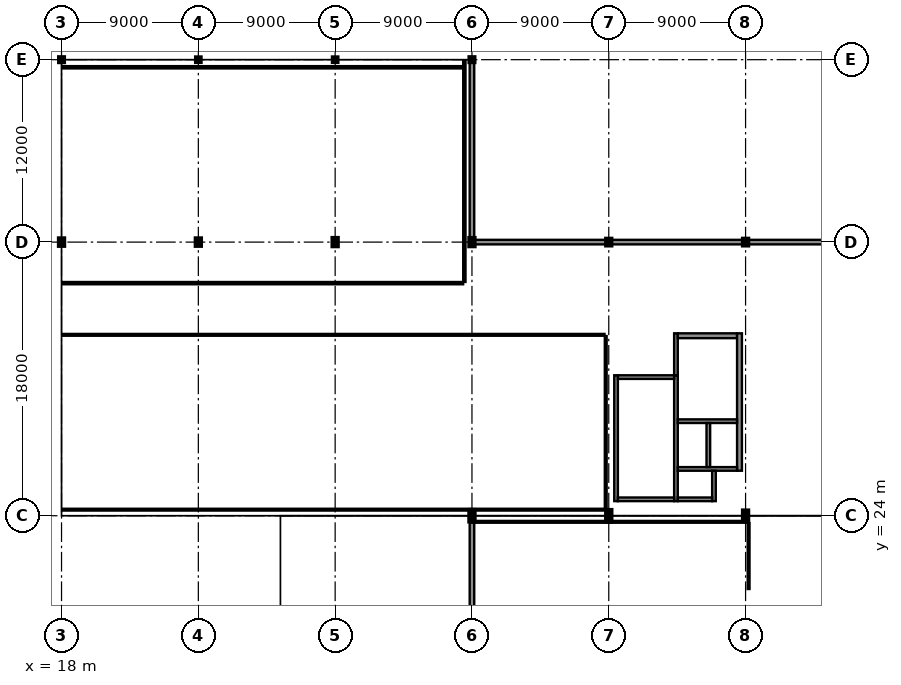
"""IFC4 building model, lengths in metres.
Left out: names, types, materials, properties, quantities, classifications, styles, units other than length and angle.
Written with IfcOpenShell. Run it as: python <this file> out.ifc"""

import sys

from ifc_helpers import new_model, si_unit, direction, frame, frame_2d, origin, origin_2d, place, context, subcontext, project, spatial, rectangle, i_section, extrude, element, fill, save


model = new_model("IFC4")
c1 = context("Model", 3, precision=1e-05, world=origin(), true_north=direction((0.0, 1.0)))
c2 = subcontext(c1, "Body", "Model", "MODEL_VIEW")
j1 = project(units=[si_unit("LENGTHUNIT", "METRE"), si_unit("PLANEANGLEUNIT", "RADIAN")], contexts=[c1])
p1 = place(None, origin())
s1 = spatial("IfcSite", under=j1, at=p1, CompositionType="ELEMENT")
p2 = place(p1, origin())
s2 = spatial("IfcBuilding", under=s1, at=p2, CompositionType="ELEMENT")
p3 = place(p2, frame((0.0, 0.0, 14.4)))
s3 = spatial("IfcBuildingStorey", under=s2, at=p3, CompositionType="ELEMENT", Elevation=14.4)
p4 = place(p3, frame((18.0, 42.0, 0.0), z_axis=(0.0, 0.0, 1.0), x_axis=(1.0, 0.0, 0.0)))
e1 = element("IfcColumn", 1, at=p4, inside=s3, PredefinedType="COLUMN", context=c2, shape_type="SweptSolid", body=[
    extrude(i_section(OverallWidth=0.3, OverallDepth=0.45, WebThickness=0.014, FlangeThickness=0.026, at=origin_2d()), origin(), (0.0, 0.0, 1.0), 4.3),
])
p5 = place(p3, frame((18.0, 54.0, 0.0), z_axis=(0.0, 0.0, 1.0), x_axis=(1.0, 0.0, 0.0)))
e2 = element("IfcColumn", 2, at=p5, inside=s3, PredefinedType="COLUMN", context=c2, shape_type="SweptSolid", body=[
    extrude(i_section(OverallWidth=0.28, OverallDepth=0.28, WebThickness=0.01, FlangeThickness=0.018, at=origin_2d()), origin(), (0.0, 0.0, 1.0), 4.3),
])
p6 = place(p3, frame((27.0, 42.0, 0.0), z_axis=(0.0, 0.0, 1.0), x_axis=(0.0, 1.0, 0.0)))
e3 = element("IfcColumn", 3, at=p6, inside=s3, PredefinedType="COLUMN", context=c2, shape_type="SweptSolid", body=[
    extrude(i_section(OverallWidth=0.3, OverallDepth=0.45, WebThickness=0.014, FlangeThickness=0.026, at=origin_2d()), origin(), (0.0, 0.0, 1.0), 4.3),
])
p7 = place(p3, frame((27.0, 54.0, 0.0), z_axis=(0.0, 0.0, 1.0), x_axis=(1.0, 0.0, 0.0)))
e4 = element("IfcColumn", 4, at=p7, inside=s3, PredefinedType="COLUMN", context=c2, shape_type="SweptSolid", body=[
    extrude(i_section(OverallWidth=0.26, OverallDepth=0.26, WebThickness=0.01, FlangeThickness=0.018, at=origin_2d()), origin(), (0.0, 0.0, 1.0), 4.3),
])
p8 = place(p3, frame((36.0, 42.0, 0.0), z_axis=(0.0, 0.0, 1.0), x_axis=(1.0, 0.0, 0.0)))
e5 = element("IfcColumn", 5, at=p8, inside=s3, PredefinedType="COLUMN", context=c2, shape_type="SweptSolid", body=[
    extrude(i_section(OverallWidth=0.3, OverallDepth=0.5, WebThickness=0.014, FlangeThickness=0.028, at=origin_2d()), origin(), (0.0, 0.0, 1.0), 4.3),
])
p9 = place(p3, frame((36.0, 54.0, 0.0), z_axis=(0.0, 0.0, 1.0), x_axis=(1.0, 0.0, 0.0)))
e6 = element("IfcColumn", 6, at=p9, inside=s3, PredefinedType="COLUMN", context=c2, shape_type="SweptSolid", body=[
    extrude(i_section(OverallWidth=0.26, OverallDepth=0.26, WebThickness=0.01, FlangeThickness=0.018, at=origin_2d()), origin(), (0.0, 0.0, 1.0), 4.3),
])
p10 = place(p3, frame((45.0, 24.0, 0.0), z_axis=(0.0, 0.0, 1.0), x_axis=(1.0, 0.0, 0.0)))
e7 = element("IfcColumn", 7, at=p10, inside=s3, PredefinedType="COLUMN", context=c2, shape_type="SweptSolid", body=[
    extrude(i_section(OverallWidth=0.304, OverallDepth=0.716, WebThickness=0.021, FlangeThickness=0.04, at=origin_2d()), origin(), (0.0, 0.0, 1.0), 4.5),
])
p11 = place(p3, frame((45.0, 42.0, 0.0), z_axis=(0.0, 0.0, 1.0), x_axis=(1.0, 0.0, 0.0)))
e8 = element("IfcColumn", 8, at=p11, inside=s3, PredefinedType="COLUMN", context=c2, shape_type="SweptSolid", body=[
    extrude(i_section(OverallWidth=0.3, OverallDepth=0.5, WebThickness=0.014, FlangeThickness=0.028, at=origin_2d()), origin(), (0.0, 0.0, 1.0), 4.3),
])
p12 = place(p3, frame((45.0, 54.0, 0.0), z_axis=(0.0, 0.0, 1.0), x_axis=(1.0, 0.0, 0.0)))
e9 = element("IfcColumn", 9, at=p12, inside=s3, PredefinedType="COLUMN", context=c2, shape_type="SweptSolid", body=[
    extrude(i_section(OverallWidth=0.28, OverallDepth=0.28, WebThickness=0.01, FlangeThickness=0.018, at=origin_2d()), origin(), (0.0, 0.0, 1.0), 4.3),
])
p13 = place(p3, frame((54.0, 24.0, 0.0), z_axis=(0.0, 0.0, 1.0), x_axis=(0.0, 1.0, 0.0)))
e10 = element("IfcColumn", 10, at=p13, inside=s3, PredefinedType="COLUMN", context=c2, shape_type="SweptSolid", body=[
    extrude(i_section(OverallWidth=0.304, OverallDepth=0.716, WebThickness=0.021, FlangeThickness=0.04, at=origin_2d()), origin(), (0.0, 0.0, 1.0), 4.5),
])
p14 = place(p3, frame((54.0, 42.0, 0.0), z_axis=(0.0, 0.0, 1.0), x_axis=(1.0, 0.0, 0.0)))
e11 = element("IfcColumn", 11, at=p14, inside=s3, PredefinedType="COLUMN", context=c2, shape_type="SweptSolid", body=[
    extrude(i_section(OverallWidth=0.3, OverallDepth=0.4, WebThickness=0.013, FlangeThickness=0.024, at=origin_2d()), origin(), (0.0, 0.0, 1.0), 4.5),
])
p15 = place(p3, frame((63.0, 24.0, 0.0), z_axis=(0.0, 0.0, 1.0), x_axis=(1.0, 0.0, 0.0)))
e12 = element("IfcColumn", 12, at=p15, inside=s3, PredefinedType="COLUMN", context=c2, shape_type="SweptSolid", body=[
    extrude(i_section(OverallWidth=0.3, OverallDepth=0.65, WebThickness=0.016, FlangeThickness=0.031, at=origin_2d()), origin(), (0.0, 0.0, 1.0), 4.5),
])
p16 = place(p3, frame((63.0, 42.0, 0.0), z_axis=(0.0, 0.0, 1.0), x_axis=(1.0, 0.0, 0.0)))
e13 = element("IfcColumn", 13, at=p16, inside=s3, PredefinedType="COLUMN", context=c2, shape_type="SweptSolid", body=[
    extrude(i_section(OverallWidth=0.3, OverallDepth=0.4, WebThickness=0.013, FlangeThickness=0.024, at=origin_2d()), origin(), (0.0, 0.0, 1.0), 4.5),
])
p17 = place(p3, frame((71.777, 42.0, 0.0), z_axis=(0.0, 0.0, 1.0), x_axis=(-1.0, 0.0, 0.0)))
e14 = element("IfcWall", 14, at=p17, inside=s3, PredefinedType="SOLIDWALL", context=c2, shape_type="SweptSolid", body=[
    extrude(rectangle(XDim=8.769, YDim=0.3, at=frame_2d((4.385, 0.0))), origin(), (0.0, 0.0, 1.0), 3.595),
])
for number, where, z_axis, x_axis in (
    (15, (62.992, 42.0, 0.0), (0.0, 0.0, 1.0), (-1.0, 0.0, 0.0)),
    (16, (53.992, 42.0, 0.0), (0.0, 0.0, 1.0), (-1.0, 0.0, 0.0)),
):
    element("IfcWall", number, at=place(p3, frame(where, z_axis=z_axis, x_axis=x_axis)), inside=s3, PredefinedType="SOLIDWALL", context=c2, shape_type="SweptSolid", body=[
        extrude(rectangle(XDim=8.984, YDim=0.3, at=frame_2d((4.492, 0.0))), origin(), (0.0, 0.0, 1.0), 3.595),
    ])
p18 = place(p3, frame((45.0, 42.248, 0.0), z_axis=(0.0, 0.0, 1.0), x_axis=(0.0, 1.0, 0.0)))
e17 = element("IfcWall", 17, at=p18, inside=s3, PredefinedType="SOLIDWALL", context=c2, shape_type="SweptSolid", body=[
    extrude(rectangle(XDim=11.614, YDim=0.3, at=frame_2d((5.807, 0.0))), origin(), (0.0, 0.0, 1.0), 3.805),
])
p19 = place(p18, frame((2.884, 0.0, 0.85)))
e18 = element("IfcOpeningElement", 18, at=p19, cuts=e17, PredefinedType="OPENING", context=c2, shape_type="SweptSolid", body=[
    extrude(rectangle(XDim=1.2, YDim=0.7, at=frame_2d((0.6, 0.35))), frame((0.0, 0.165, 0.0), z_axis=(0.0, -1.0, 0.0), x_axis=(1.0, 0.0, 0.0)), (0.0, 0.0, 1.0), 0.33),
])
p20 = place(p18, frame((7.53, 0.0, 0.85)))
e19 = element("IfcOpeningElement", 19, at=p20, cuts=e17, PredefinedType="OPENING", context=c2, shape_type="SweptSolid", body=[
    extrude(rectangle(XDim=1.2, YDim=0.7, at=frame_2d((0.6, 0.35))), frame((0.0, 0.165, 0.0), z_axis=(0.0, -1.0, 0.0), x_axis=(1.0, 0.0, 0.0)), (0.0, 0.0, 1.0), 0.33),
])
p21 = place(p3, frame((45.0, 23.644, 0.0), z_axis=(0.0, 0.0, 1.0), x_axis=(0.0, -1.0, 0.0)))
e20 = element("IfcWall", 20, at=p21, inside=s3, PredefinedType="SOLIDWALL", context=c2, shape_type="SweptSolid", body=[
    extrude(rectangle(XDim=11.336, YDim=0.3, at=frame_2d((5.668, 0.0))), origin(), (0.0, 0.0, 1.0), 3.685),
])
p22 = place(p21, frame((5.444, 0.0, 0.0)))
e21 = element("IfcOpeningElement", 21, at=p22, cuts=e20, PredefinedType="OPENING", context=c2, shape_type="SweptSolid", body=[
    extrude(rectangle(XDim=1.4, YDim=2.3, at=frame_2d((0.7, 1.15))), frame((0.0, 0.165, 0.0), z_axis=(0.0, -1.0, 0.0), x_axis=(1.0, 0.0, 0.0)), (0.0, 0.0, 1.0), 0.33),
])
p23 = place(p3, frame((54.48, 24.96, 0.0), z_axis=(0.0, 0.0, 1.0), x_axis=(0.0, 1.0, 0.0)))
e22 = element("IfcWall", 22, at=p23, inside=s3, PredefinedType="SHEAR", context=c2, shape_type="SweptSolid", body=[
    extrude(rectangle(XDim=8.28, YDim=0.24, at=frame_2d((4.14, 0.0))), origin(), (0.0, 0.0, 1.0), 4.31),
])
p24 = place(p3, frame((58.42, 24.96, 0.0), z_axis=(0.0, 0.0, 1.0), x_axis=(0.0, 1.0, 0.0)))
e23 = element("IfcWall", 23, at=p24, inside=s3, PredefinedType="SHEAR", context=c2, shape_type="SweptSolid", body=[
    extrude(rectangle(XDim=8.28, YDim=0.24, at=frame_2d((4.14, 0.0))), origin(), (0.0, 0.0, 1.0), 4.31),
])
p25 = place(p24, frame((6.49, 0.0, 0.0)))
e24 = element("IfcOpeningElement", 24, at=p25, cuts=e23, PredefinedType="OPENING", context=c2, shape_type="SweptSolid", body=[
    extrude(rectangle(XDim=1.3, YDim=2.2, at=frame_2d((0.65, 1.1))), frame((0.0, 0.135, 0.0), z_axis=(0.0, -1.0, 0.0), x_axis=(1.0, 0.0, 0.0)), (0.0, 0.0, 1.0), 0.27),
])
for number, where, z_axis, x_axis in (
    (25, (54.6, 25.08, 0.0), (0.0, 0.0, 1.0), (1.0, 0.0, 0.0)),
    (26, (54.6, 33.12, 0.0), (0.0, 0.0, 1.0), (1.0, 0.0, 0.0)),
):
    element("IfcWall", number, at=place(p3, frame(where, z_axis=z_axis, x_axis=x_axis)), inside=s3, PredefinedType="SHEAR", context=c2, shape_type="SweptSolid", body=[
        extrude(rectangle(XDim=3.7, YDim=0.24, at=frame_2d((1.85, 0.0))), origin(), (0.0, 0.0, 1.0), 4.31),
    ])
p26 = place(p3, frame((58.42, 33.24, 0.0), z_axis=(0.0, 0.0, 1.0), x_axis=(0.0, 1.0, 0.0)))
e27 = element("IfcWall", 27, at=p26, inside=s3, PredefinedType="SHEAR", context=c2, shape_type="SweptSolid", body=[
    extrude(rectangle(XDim=2.76, YDim=0.24, at=frame_2d((1.38, 0.0))), origin(), (0.0, 0.0, 1.0), 4.16),
])
p27 = place(p3, frame((58.54, 35.84, 0.0), z_axis=(0.0, 0.0, 1.0), x_axis=(1.0, 0.0, 0.0)))
e28 = element("IfcWall", 28, at=p27, inside=s3, PredefinedType="SHEAR", context=c2, shape_type="SweptSolid", body=[
    extrude(rectangle(XDim=3.9, YDim=0.32, at=frame_2d((1.95, 0.0))), origin(), (0.0, 0.0, 1.0), 4.16),
])
p28 = place(p27, frame((1.225, 0.0, 0.0)))
e29 = element("IfcOpeningElement", 29, at=p28, cuts=e28, PredefinedType="OPENING", context=c2, shape_type="SweptSolid", body=[
    extrude(rectangle(XDim=1.45, YDim=2.2, at=frame_2d((0.725, 1.1))), frame((0.0, 0.175, 0.0), z_axis=(0.0, -1.0, 0.0), x_axis=(1.0, 0.0, 0.0)), (0.0, 0.0, 1.0), 0.35),
])
p29 = place(p3, frame((62.6, 26.96, 0.0), z_axis=(0.0, 0.0, 1.0), x_axis=(0.0, 1.0, 0.0)))
e30 = element("IfcWall", 30, at=p29, inside=s3, PredefinedType="SHEAR", context=c2, shape_type="SweptSolid", body=[
    extrude(rectangle(XDim=9.04, YDim=0.32, at=frame_2d((4.52, 0.0))), origin(), (0.0, 0.0, 1.0), 4.16),
])
p30 = place(p3, frame((58.54, 30.22, 0.0), z_axis=(0.0, 0.0, 1.0), x_axis=(1.0, 0.0, 0.0)))
e31 = element("IfcWall", 31, at=p30, inside=s3, PredefinedType="SHEAR", context=c2, shape_type="SweptSolid", body=[
    extrude(rectangle(XDim=3.9, YDim=0.24, at=frame_2d((1.95, 0.0))), origin(), (0.0, 0.0, 1.0), 4.31),
])
p31 = place(p30, frame((0.385, 0.0, 0.0)))
e32 = element("IfcOpeningElement", 32, at=p31, cuts=e31, PredefinedType="OPENING", context=c2, shape_type="SweptSolid", body=[
    extrude(rectangle(XDim=1.3, YDim=2.2, at=frame_2d((0.65, 1.1))), frame((0.0, 0.135, 0.0), z_axis=(0.0, -1.0, 0.0), x_axis=(1.0, 0.0, 0.0)), (0.0, 0.0, 1.0), 0.27),
])
p32 = place(p30, frame((2.335, 0.0, 0.0)))
e33 = element("IfcOpeningElement", 33, at=p32, cuts=e31, PredefinedType="OPENING", context=c2, shape_type="SweptSolid", body=[
    extrude(rectangle(XDim=1.3, YDim=2.2, at=frame_2d((0.65, 1.1))), frame((0.0, 0.135, 0.0), z_axis=(0.0, -1.0, 0.0), x_axis=(1.0, 0.0, 0.0)), (0.0, 0.0, 1.0), 0.27),
])
p33 = place(p3, frame((58.54, 27.08, 0.0), z_axis=(0.0, 0.0, 1.0), x_axis=(1.0, 0.0, 0.0)))
e34 = element("IfcWall", 34, at=p33, inside=s3, PredefinedType="SHEAR", context=c2, shape_type="SweptSolid", body=[
    extrude(rectangle(XDim=3.9, YDim=0.24, at=frame_2d((1.95, 0.0))), origin(), (0.0, 0.0, 1.0), 4.31),
])
p34 = place(p3, frame((60.55, 27.2, 0.0), z_axis=(0.0, 0.0, 1.0), x_axis=(0.0, 1.0, 0.0)))
e35 = element("IfcWall", 35, at=p34, inside=s3, PredefinedType="SHEAR", context=c2, shape_type="SweptSolid", body=[
    extrude(rectangle(XDim=2.9, YDim=0.24, at=frame_2d((1.45, 0.0))), origin(), (0.0, 0.0, 1.0), 4.31),
])
p35 = place(p3, frame((60.92, 24.96, 0.0), z_axis=(0.0, 0.0, 1.0), x_axis=(0.0, 1.0, 0.0)))
e36 = element("IfcWall", 36, at=p35, inside=s3, PredefinedType="SHEAR", context=c2, shape_type="SweptSolid", body=[
    extrude(rectangle(XDim=2.0, YDim=0.24, at=frame_2d((1.0, 0.0))), origin(), (0.0, 0.0, 1.0), 4.31),
])
p36 = place(p3, frame((58.54, 25.08, 0.0), z_axis=(0.0, 0.0, 1.0), x_axis=(1.0, 0.0, 0.0)))
e37 = element("IfcWall", 37, at=p36, inside=s3, PredefinedType="SHEAR", context=c2, shape_type="SweptSolid", body=[
    extrude(rectangle(XDim=2.26, YDim=0.24, at=frame_2d((1.13, 0.0))), origin(), (0.0, 0.0, 1.0), 4.31),
])
p37 = place(p3, frame((18.075, 35.9, 0.0), z_axis=(0.0, 0.0, 1.0), x_axis=(1.0, 0.0, 0.0)))
e38 = element("IfcWall", 38, at=p37, inside=s3, PredefinedType="PARTITIONING", context=c2, shape_type="SweptSolid", body=[
    extrude(rectangle(XDim=35.645, YDim=0.12, at=frame_2d((17.823, 0.0))), origin(), (0.0, 0.0, 1.0), 4.14),
])
p38 = place(p37, frame((17.347, 0.0, 0.0)))
e39 = element("IfcOpeningElement", 39, at=p38, cuts=e38, PredefinedType="OPENING", context=c2, shape_type="SweptSolid", body=[
    extrude(rectangle(XDim=0.95, YDim=2.15, at=frame_2d((0.475, 1.075))), frame((0.0, 0.075, 0.0), z_axis=(0.0, -1.0, 0.0), x_axis=(1.0, 0.0, 0.0)), (0.0, 0.0, 1.0), 0.15),
])
p39 = place(p3, frame((53.8, 35.82, 0.0), z_axis=(0.0, 0.0, 1.0), x_axis=(0.0, -1.0, 0.0)))
e40 = element("IfcWall", 40, at=p39, inside=s3, PredefinedType="PARTITIONING", context=c2, shape_type="SweptSolid", body=[
    extrude(rectangle(XDim=11.34, YDim=0.12, at=frame_2d((5.67, 0.0))), origin(), (0.0, 0.0, 1.0), 4.14),
])
p40 = place(p3, frame((53.72, 24.4, 0.0), z_axis=(0.0, 0.0, 1.0), x_axis=(-1.0, 0.0, 0.0)))
e41 = element("IfcWall", 41, at=p40, inside=s3, PredefinedType="PARTITIONING", context=c2, shape_type="SweptSolid", body=[
    extrude(rectangle(XDim=35.645, YDim=0.12, at=frame_2d((17.823, 0.0))), origin(), (0.0, 0.0, 1.0), 4.14),
])
p41 = place(p3, frame((44.5, 53.925, 0.0), z_axis=(0.0, 0.0, 1.0), x_axis=(0.0, -1.0, 0.0)))
e42 = element("IfcWall", 42, at=p41, inside=s3, PredefinedType="PARTITIONING", context=c2, shape_type="SweptSolid", body=[
    extrude(rectangle(XDim=14.545, YDim=0.15, at=frame_2d((7.272, 0.0))), origin(), (0.0, 0.0, 1.0), 4.14),
])
p42 = place(p3, frame((44.42, 39.3, 0.0), z_axis=(0.0, 0.0, 1.0), x_axis=(-1.0, 0.0, 0.0)))
e43 = element("IfcWall", 43, at=p42, inside=s3, PredefinedType="PARTITIONING", context=c2, shape_type="SweptSolid", body=[
    extrude(rectangle(XDim=26.345, YDim=0.15, at=frame_2d((13.172, 0.0))), origin(), (0.0, 0.0, 1.0), 4.14),
])
p43 = place(p42, frame((12.647, 0.0, 0.0)))
e44 = element("IfcOpeningElement", 44, at=p43, cuts=e43, PredefinedType="OPENING", context=c2, shape_type="SweptSolid", body=[
    extrude(rectangle(XDim=1.05, YDim=2.25, at=frame_2d((0.525, 1.125))), frame((0.0, 0.09, 0.0), z_axis=(0.0, -1.0, 0.0), x_axis=(1.0, 0.0, 0.0)), (0.0, 0.0, 1.0), 0.18),
])
p44 = place(p3, frame((18.075, 53.5, 0.0), z_axis=(0.0, 0.0, 1.0), x_axis=(1.0, 0.0, 0.0)))
e45 = element("IfcWall", 45, at=p44, inside=s3, PredefinedType="PARTITIONING", context=c2, shape_type="SweptSolid", body=[
    extrude(rectangle(XDim=26.355, YDim=0.15, at=frame_2d((13.177, 0.0))), origin(), (0.0, 0.0, 1.0), 4.14),
])
p45 = place(p3, frame((45.008, 23.6, 0.0), z_axis=(0.0, 0.0, 1.0), x_axis=(1.0, 0.0, 0.0)))
e46 = element("IfcWall", 46, at=p45, inside=s3, PredefinedType="PARTITIONING", context=c2, shape_type="SweptSolid", body=[
    extrude(rectangle(XDim=18.112, YDim=0.12, at=frame_2d((9.056, 0.0))), origin(), (0.0, 0.0, 1.0), 4.14),
])
p46 = place(p45, frame((10.03, 0.0, 0.0)))
e47 = element("IfcOpeningElement", 47, at=p46, cuts=e46, PredefinedType="OPENING", context=c2, shape_type="SweptSolid", body=[
    extrude(rectangle(XDim=0.95, YDim=2.15, at=frame_2d((0.475, 1.075))), frame((0.0, 0.075, 0.0), z_axis=(0.0, -1.0, 0.0), x_axis=(1.0, 0.0, 0.0)), (0.0, 0.0, 1.0), 0.15),
])
p47 = place(p3, frame((63.2, 23.52, 0.0), z_axis=(0.0, 0.0, 1.0), x_axis=(0.0, -1.0, 0.0)))
e48 = element("IfcWall", 48, at=p47, inside=s3, PredefinedType="PARTITIONING", context=c2, shape_type="SweptSolid", body=[
    extrude(rectangle(XDim=4.34, YDim=0.12, at=frame_2d((2.17, 0.0))), origin(), (0.0, 0.0, 1.0), 3.575),
])
p48 = place(p22, frame((1.4, 0.0, 0.0), z_axis=(0.0, 0.0, 1.0), x_axis=(-1.0, 0.0, 0.0)))
e49 = element("IfcDoor", 49, at=p48, inside=s3, OperationType="DOUBLE_DOOR_SINGLE_SWING", PredefinedType="DOOR", context=c2, shape_type="SweptSolid", body=[
    extrude(rectangle(XDim=1.4, YDim=2.3, at=frame_2d((0.7, 1.15))), frame((0.0, 0.025, 0.0), z_axis=(0.0, -1.0, 0.0), x_axis=(1.0, 0.0, 0.0)), (0.0, 0.0, 1.0), 0.05),
])
fill(e21, e49)
p49 = place(p19, origin())
e50 = element("IfcWindow", 50, at=p49, inside=s3, PartitioningType="SINGLE_PANEL", PredefinedType="WINDOW", context=c2, shape_type="SweptSolid", body=[
    extrude(rectangle(XDim=1.2, YDim=0.7, at=frame_2d((0.6, 0.35))), frame((0.0, 0.03, 0.0), z_axis=(0.0, -1.0, 0.0), x_axis=(1.0, 0.0, 0.0)), (0.0, 0.0, 1.0), 0.06),
])
fill(e18, e50)
p50 = place(p20, origin())
e51 = element("IfcWindow", 51, at=p50, inside=s3, PartitioningType="SINGLE_PANEL", PredefinedType="WINDOW", context=c2, shape_type="SweptSolid", body=[
    extrude(rectangle(XDim=1.2, YDim=0.7, at=frame_2d((0.6, 0.35))), frame((0.0, 0.03, 0.0), z_axis=(0.0, -1.0, 0.0), x_axis=(1.0, 0.0, 0.0)), (0.0, 0.0, 1.0), 0.06),
])
fill(e19, e51)
p51 = place(p25, frame((1.3, 0.0, 0.0), z_axis=(0.0, 0.0, 1.0), x_axis=(-1.0, 0.0, 0.0)))
e52 = element("IfcDoor", 52, at=p51, inside=s3, OperationType="SINGLE_SWING_LEFT", PredefinedType="DOOR", context=c2, shape_type="SweptSolid", body=[
    extrude(rectangle(XDim=1.3, YDim=2.2, at=frame_2d((0.65, 1.1))), frame((0.0, 0.025, 0.0), z_axis=(0.0, -1.0, 0.0), x_axis=(1.0, 0.0, 0.0)), (0.0, 0.0, 1.0), 0.05),
])
fill(e24, e52)
p52 = place(p28, origin())
e53 = element("IfcDoor", 53, at=p52, inside=s3, OperationType="DOUBLE_DOOR_SINGLE_SWING", PredefinedType="DOOR", context=c2, shape_type="SweptSolid", body=[
    extrude(rectangle(XDim=1.45, YDim=2.2, at=frame_2d((0.725, 1.1))), frame((0.0, 0.025, 0.0), z_axis=(0.0, -1.0, 0.0), x_axis=(1.0, 0.0, 0.0)), (0.0, 0.0, 1.0), 0.05),
])
fill(e29, e53)
p53 = place(p31, origin())
e54 = element("IfcDoor", 54, at=p53, inside=s3, OperationType="DOUBLE_DOOR_SLIDING", PredefinedType="DOOR", context=c2, shape_type="SweptSolid", body=[
    extrude(rectangle(XDim=1.3, YDim=2.2, at=frame_2d((0.65, 1.1))), frame((0.0, 0.025, 0.0), z_axis=(0.0, -1.0, 0.0), x_axis=(1.0, 0.0, 0.0)), (0.0, 0.0, 1.0), 0.05),
])
fill(e32, e54)
p54 = place(p32, origin())
e55 = element("IfcDoor", 55, at=p54, inside=s3, OperationType="DOUBLE_DOOR_SLIDING", PredefinedType="DOOR", context=c2, shape_type="SweptSolid", body=[
    extrude(rectangle(XDim=1.3, YDim=2.2, at=frame_2d((0.65, 1.1))), frame((0.0, 0.025, 0.0), z_axis=(0.0, -1.0, 0.0), x_axis=(1.0, 0.0, 0.0)), (0.0, 0.0, 1.0), 0.05),
])
fill(e33, e55)
p55 = place(p38, origin())
e56 = element("IfcDoor", 56, at=p55, inside=s3, OperationType="SINGLE_SWING_RIGHT", PredefinedType="DOOR", context=c2, shape_type="SweptSolid", body=[
    extrude(rectangle(XDim=0.95, YDim=2.15, at=frame_2d((0.475, 1.075))), frame((0.0, 0.025, 0.0), z_axis=(0.0, -1.0, 0.0), x_axis=(1.0, 0.0, 0.0)), (0.0, 0.0, 1.0), 0.05),
])
fill(e39, e56)
p56 = place(p43, frame((1.05, 0.0, 0.0), z_axis=(0.0, 0.0, 1.0), x_axis=(-1.0, 0.0, 0.0)))
e57 = element("IfcDoor", 57, at=p56, inside=s3, OperationType="SINGLE_SWING_LEFT", PredefinedType="DOOR", context=c2, shape_type="SweptSolid", body=[
    extrude(rectangle(XDim=1.05, YDim=2.25, at=frame_2d((0.525, 1.125))), frame((0.0, 0.025, 0.0), z_axis=(0.0, -1.0, 0.0), x_axis=(1.0, 0.0, 0.0)), (0.0, 0.0, 1.0), 0.05),
])
fill(e44, e57)
p57 = place(p46, origin())
e58 = element("IfcDoor", 58, at=p57, inside=s3, OperationType="SINGLE_SWING_RIGHT", PredefinedType="DOOR", context=c2, shape_type="SweptSolid", body=[
    extrude(rectangle(XDim=0.95, YDim=2.15, at=frame_2d((0.475, 1.075))), frame((0.0, 0.025, 0.0), z_axis=(0.0, -1.0, 0.0), x_axis=(1.0, 0.0, 0.0)), (0.0, 0.0, 1.0), 0.05),
])
fill(e47, e58)
save(model, sys.argv[1])
